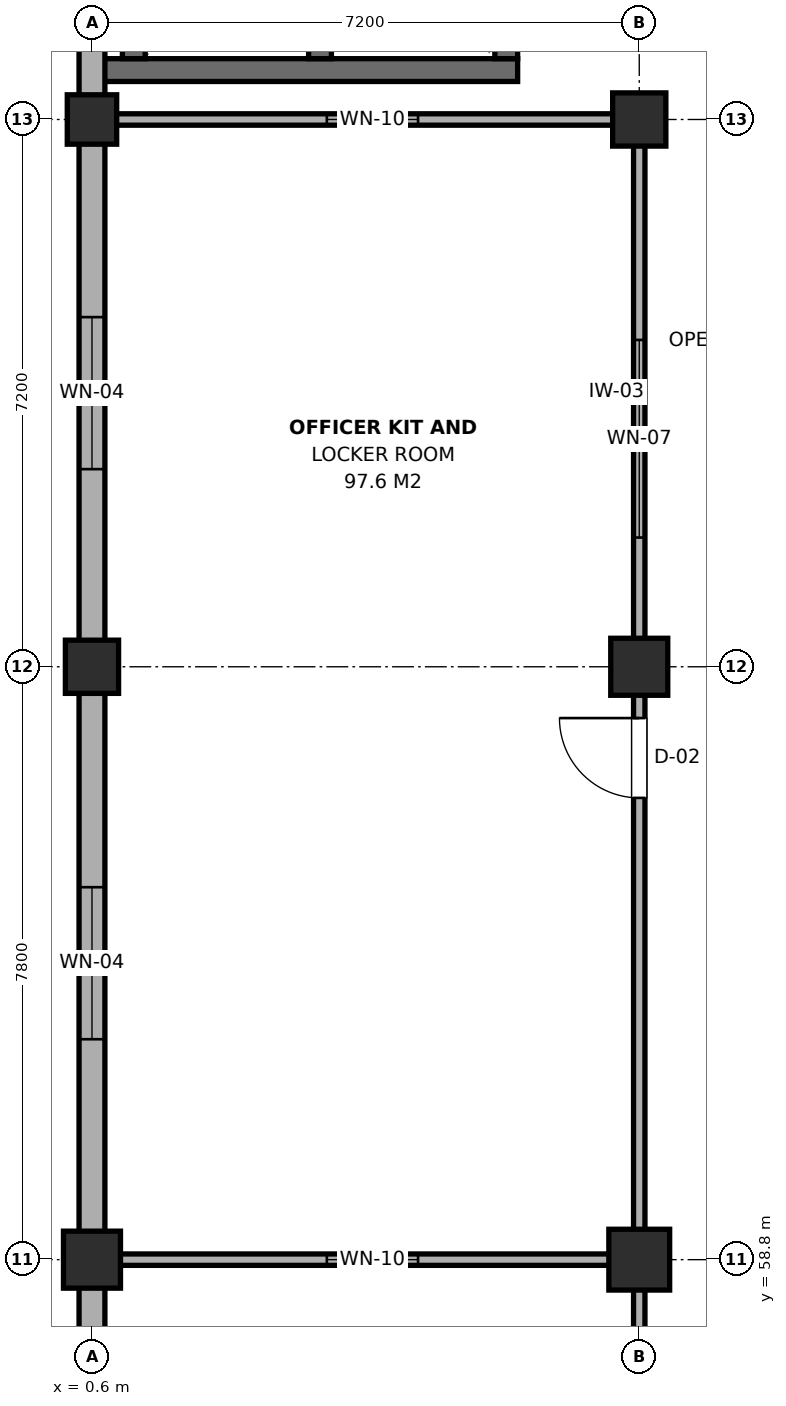
"""IFC4 building model, lengths in metres.
Left out: names, types, materials, properties, quantities, classifications, styles, units other than length and angle.
Written with IfcOpenShell. Run it as: python <this file> out.ifc"""

import sys

from ifc_helpers import new_model, si_unit, direction, frame, frame_2d, origin, origin_2d, place, context, subcontext, project, spatial, rectangle, extrude, element, fill, save


model = new_model("IFC4")
c1 = context("Model", 3, precision=1e-05, world=origin(), true_north=direction((0.0, 1.0)))
c2 = subcontext(c1, "Body", "Model", "MODEL_VIEW")
j1 = project(units=[si_unit("LENGTHUNIT", "METRE"), si_unit("PLANEANGLEUNIT", "RADIAN")], contexts=[c1])
p1 = place(None, origin())
s1 = spatial("IfcSite", under=j1, at=p1, CompositionType="ELEMENT")
p2 = place(p1, origin())
s2 = spatial("IfcBuilding", under=s1, at=p2, CompositionType="ELEMENT")
p3 = place(p2, origin())
s3 = spatial("IfcBuildingStorey", under=s2, at=p3, CompositionType="ELEMENT", Elevation=0.0)
p4 = place(p3, frame((0.6, 58.8, 0.0), z_axis=(0.0, 0.0, 1.0), x_axis=(1.0, 0.0, 0.0)))
e1 = element("IfcColumn", 1, at=p4, inside=s3, PredefinedType="COLUMN", context=c2, shape_type="SweptSolid", body=[
    extrude(rectangle(XDim=0.75, YDim=0.75, at=origin_2d()), origin(), (0.0, 0.0, 1.0), 4.8),
])
p5 = place(p3, frame((0.6, 66.6, 0.0), z_axis=(0.0, 0.0, 1.0), x_axis=(1.0, 0.0, 0.0)))
e2 = element("IfcColumn", 2, at=p5, inside=s3, PredefinedType="COLUMN", context=c2, shape_type="SweptSolid", body=[
    extrude(rectangle(XDim=0.7, YDim=0.7, at=origin_2d()), origin(), (0.0, 0.0, 1.0), 4.8),
])
p6 = place(p3, frame((0.6, 73.8, 0.0), z_axis=(0.0, 0.0, 1.0), x_axis=(1.0, 0.0, 0.0)))
e3 = element("IfcColumn", 3, at=p6, inside=s3, PredefinedType="COLUMN", context=c2, shape_type="SweptSolid", body=[
    extrude(rectangle(XDim=0.65, YDim=0.65, at=origin_2d()), origin(), (0.0, 0.0, 1.0), 4.8),
])
p7 = place(p3, frame((7.8, 58.8, 0.0), z_axis=(0.0, 0.0, 1.0), x_axis=(1.0, 0.0, 0.0)))
e4 = element("IfcColumn", 4, at=p7, inside=s3, PredefinedType="COLUMN", context=c2, shape_type="SweptSolid", body=[
    extrude(rectangle(XDim=0.8, YDim=0.8, at=origin_2d()), origin(), (0.0, 0.0, 1.0), 4.8),
])
p8 = place(p3, frame((7.8, 66.6, 0.0), z_axis=(0.0, 0.0, 1.0), x_axis=(1.0, 0.0, 0.0)))
e5 = element("IfcColumn", 5, at=p8, inside=s3, PredefinedType="COLUMN", context=c2, shape_type="SweptSolid", body=[
    extrude(rectangle(XDim=0.75, YDim=0.75, at=origin_2d()), origin(), (0.0, 0.0, 1.0), 4.8),
])
p9 = place(p3, frame((7.8, 73.8, 0.0), z_axis=(0.0, 0.0, 1.0), x_axis=(1.0, 0.0, 0.0)))
e6 = element("IfcColumn", 6, at=p9, inside=s3, PredefinedType="COLUMN", context=c2, shape_type="SweptSolid", body=[
    extrude(rectangle(XDim=0.7, YDim=0.7, at=origin_2d()), origin(), (0.0, 0.0, 1.0), 4.8),
])
p10 = place(p3, frame((0.75, 74.45, 0.0), z_axis=(0.0, 0.0, 1.0), x_axis=(1.0, 0.0, 0.0)))
e7 = element("IfcWall", 7, at=p10, inside=s3, PredefinedType="SHEAR", context=c2, shape_type="SweptSolid", body=[
    extrude(rectangle(XDim=5.45, YDim=0.3, at=frame_2d((2.725, 0.0))), origin(), (0.0, 0.0, 1.0), 4.56),
])
for number, where, z_axis, x_axis in (
    (8, (1.15, 74.6, 0.0), (0.0, 0.0, 1.0), (0.0, 1.0, 0.0)),
    (9, (3.6, 74.6, 0.0), (0.0, 0.0, 1.0), (0.0, 1.0, 0.0)),
):
    element("IfcWall", number, at=place(p3, frame(where, z_axis=z_axis, x_axis=x_axis)), inside=s3, PredefinedType="SHEAR", context=c2, shape_type="SweptSolid", body=[
        extrude(rectangle(XDim=3.0, YDim=0.3, at=frame_2d((1.5, 0.0))), origin(), (0.0, 0.0, 1.0), 4.56),
    ])
p11 = place(p3, frame((6.05, 74.6, 0.0), z_axis=(0.0, 0.0, 1.0), x_axis=(0.0, 1.0, 0.0)))
e10 = element("IfcWall", 10, at=p11, inside=s3, PredefinedType="SHEAR", context=c2, shape_type="SweptSolid", body=[
    extrude(rectangle(XDim=2.4, YDim=0.3, at=frame_2d((1.2, 0.0))), origin(), (0.0, 0.0, 1.0), 4.56),
])
p12 = place(p11, frame((0.7, 0.0, 0.0)))
e11 = element("IfcOpeningElement", 11, at=p12, cuts=e10, PredefinedType="OPENING", context=c2, shape_type="SweptSolid", body=[
    extrude(rectangle(XDim=1.0, YDim=2.15, at=frame_2d((0.5, 1.075))), frame((0.0, 0.165, 0.0), z_axis=(0.0, -1.0, 0.0), x_axis=(1.0, 0.0, 0.0)), (0.0, 0.0, 1.0), 0.33),
])
p13 = place(p3, frame((0.6, 53.2, 0.0), z_axis=(0.0, 0.0, 1.0), x_axis=(0.0, 1.0, 0.0)))
e12 = element("IfcWall", 12, at=p13, inside=s3, PredefinedType="SOLIDWALL", context=c2, shape_type="SweptSolid", body=[
    extrude(rectangle(XDim=5.6, YDim=0.34, at=frame_2d((2.8, 0.0))), origin(), (0.0, 0.0, 1.0), 3.955),
])
p14 = place(p13, frame((1.8, 0.0, 0.9)))
e13 = element("IfcOpeningElement", 13, at=p14, cuts=e12, PredefinedType="OPENING", context=c2, shape_type="SweptSolid", body=[
    extrude(rectangle(XDim=2.0, YDim=1.8, at=frame_2d((1.0, 0.9))), frame((0.0, 0.185, 0.0), z_axis=(0.0, -1.0, 0.0), x_axis=(1.0, 0.0, 0.0)), (0.0, 0.0, 1.0), 0.37),
])
p15 = place(p3, frame((0.6, 58.8, 0.0), z_axis=(0.0, 0.0, 1.0), x_axis=(0.0, 1.0, 0.0)))
e14 = element("IfcWall", 14, at=p15, inside=s3, PredefinedType="SOLIDWALL", context=c2, shape_type="SweptSolid", body=[
    extrude(rectangle(XDim=7.8, YDim=0.34, at=frame_2d((3.9, 0.0))), origin(), (0.0, 0.0, 1.0), 4.005),
])
p16 = place(p15, frame((2.9, 0.0, 0.9)))
e15 = element("IfcOpeningElement", 15, at=p16, cuts=e14, PredefinedType="OPENING", context=c2, shape_type="SweptSolid", body=[
    extrude(rectangle(XDim=2.0, YDim=1.8, at=frame_2d((1.0, 0.9))), frame((0.0, 0.185, 0.0), z_axis=(0.0, -1.0, 0.0), x_axis=(1.0, 0.0, 0.0)), (0.0, 0.0, 1.0), 0.37),
])
p17 = place(p3, frame((0.6, 66.6, 0.0), z_axis=(0.0, 0.0, 1.0), x_axis=(0.0, 1.0, 0.0)))
e16 = element("IfcWall", 16, at=p17, inside=s3, PredefinedType="SOLIDWALL", context=c2, shape_type="SweptSolid", body=[
    extrude(rectangle(XDim=7.2, YDim=0.34, at=frame_2d((3.6, 0.0))), origin(), (0.0, 0.0, 1.0), 4.055),
])
p18 = place(p17, frame((2.6, 0.0, 0.9)))
e17 = element("IfcOpeningElement", 17, at=p18, cuts=e16, PredefinedType="OPENING", context=c2, shape_type="SweptSolid", body=[
    extrude(rectangle(XDim=2.0, YDim=1.8, at=frame_2d((1.0, 0.9))), frame((0.0, 0.185, 0.0), z_axis=(0.0, -1.0, 0.0), x_axis=(1.0, 0.0, 0.0)), (0.0, 0.0, 1.0), 0.37),
])
p19 = place(p3, frame((0.6, 73.8, 0.0), z_axis=(0.0, 0.0, 1.0), x_axis=(0.0, 1.0, 0.0)))
e18 = element("IfcWall", 18, at=p19, inside=s3, PredefinedType="SOLIDWALL", context=c2, shape_type="SweptSolid", body=[
    extrude(rectangle(XDim=7.2, YDim=0.34, at=frame_2d((3.6, 0.0))), origin(), (0.0, 0.0, 1.0), 4.105),
])
p20 = place(p3, frame((7.8, 40.4, 0.0), z_axis=(0.0, 0.0, 1.0), x_axis=(0.0, 1.0, 0.0)))
e19 = element("IfcWall", 19, at=p20, inside=s3, PredefinedType="PARTITIONING", context=c2, shape_type="SweptSolid", body=[
    extrude(rectangle(XDim=18.4, YDim=0.15, at=frame_2d((9.2, 0.0))), origin(), (0.0, 0.0, 1.0), 3.955),
])
p21 = place(p20, frame((8.4, 0.0, 0.0)))
e20 = element("IfcOpeningElement", 20, at=p21, cuts=e19, PredefinedType="OPENING", context=c2, shape_type="SweptSolid", body=[
    extrude(rectangle(XDim=1.6, YDim=2.15, at=frame_2d((0.8, 1.075))), frame((0.0, 0.09, 0.0), z_axis=(0.0, -1.0, 0.0), x_axis=(1.0, 0.0, 0.0)), (0.0, 0.0, 1.0), 0.18),
])
p22 = place(p20, frame((3.3, 0.0, 0.95)))
e21 = element("IfcOpeningElement", 21, at=p22, cuts=e19, PredefinedType="OPENING", context=c2, shape_type="SweptSolid", body=[
    extrude(rectangle(XDim=2.6, YDim=1.5, at=frame_2d((1.3, 0.75))), frame((0.0, 0.09, 0.0), z_axis=(0.0, -1.0, 0.0), x_axis=(1.0, 0.0, 0.0)), (0.0, 0.0, 1.0), 0.18),
])
p23 = place(p3, frame((7.8, 58.8, 0.0), z_axis=(0.0, 0.0, 1.0), x_axis=(0.0, 1.0, 0.0)))
e22 = element("IfcWall", 22, at=p23, inside=s3, PredefinedType="PARTITIONING", context=c2, shape_type="SweptSolid", body=[
    extrude(rectangle(XDim=15.0, YDim=0.15, at=frame_2d((7.5, 0.0))), origin(), (0.0, 0.0, 1.0), 4.005),
])
p24 = place(p23, frame((6.075, 0.0, 0.0)))
e23 = element("IfcOpeningElement", 23, at=p24, cuts=e22, PredefinedType="OPENING", context=c2, shape_type="SweptSolid", body=[
    extrude(rectangle(XDim=1.05, YDim=2.15, at=frame_2d((0.525, 1.075))), frame((0.0, 0.09, 0.0), z_axis=(0.0, -1.0, 0.0), x_axis=(1.0, 0.0, 0.0)), (0.0, 0.0, 1.0), 0.18),
])
p25 = place(p23, frame((9.5, 0.0, 0.95)))
e24 = element("IfcOpeningElement", 24, at=p25, cuts=e22, PredefinedType="OPENING", context=c2, shape_type="SweptSolid", body=[
    extrude(rectangle(XDim=2.6, YDim=1.5, at=frame_2d((1.3, 0.75))), frame((0.0, 0.09, 0.0), z_axis=(0.0, -1.0, 0.0), x_axis=(1.0, 0.0, 0.0)), (0.0, 0.0, 1.0), 0.18),
])
p26 = place(p3, frame((0.78, 58.8, 0.0), z_axis=(0.0, 0.0, 1.0), x_axis=(1.0, 0.0, 0.0)))
e25 = element("IfcWall", 25, at=p26, inside=s3, PredefinedType="PARTITIONING", context=c2, shape_type="SweptSolid", body=[
    extrude(rectangle(XDim=7.02, YDim=0.15, at=frame_2d((3.51, 0.0))), origin(), (0.0, 0.0, 1.0), 4.205),
])
p27 = place(p26, frame((2.91, 0.0, 0.95)))
e26 = element("IfcOpeningElement", 26, at=p27, cuts=e25, PredefinedType="OPENING", context=c2, shape_type="SweptSolid", body=[
    extrude(rectangle(XDim=1.2, YDim=1.5, at=frame_2d((0.6, 0.75))), frame((0.0, 0.09, 0.0), z_axis=(0.0, -1.0, 0.0), x_axis=(1.0, 0.0, 0.0)), (0.0, 0.0, 1.0), 0.18),
])
p28 = place(p3, frame((0.78, 73.8, 0.0), z_axis=(0.0, 0.0, 1.0), x_axis=(1.0, 0.0, 0.0)))
e27 = element("IfcWall", 27, at=p28, inside=s3, PredefinedType="PARTITIONING", context=c2, shape_type="SweptSolid", body=[
    extrude(rectangle(XDim=7.02, YDim=0.15, at=frame_2d((3.51, 0.0))), origin(), (0.0, 0.0, 1.0), 4.105),
])
p29 = place(p28, frame((2.91, 0.0, 0.95)))
e28 = element("IfcOpeningElement", 28, at=p29, cuts=e27, PredefinedType="OPENING", context=c2, shape_type="SweptSolid", body=[
    extrude(rectangle(XDim=1.2, YDim=1.5, at=frame_2d((0.6, 0.75))), frame((0.0, 0.09, 0.0), z_axis=(0.0, -1.0, 0.0), x_axis=(1.0, 0.0, 0.0)), (0.0, 0.0, 1.0), 0.18),
])
p30 = place(p16, origin())
e29 = element("IfcWindow", 29, at=p30, inside=s3, PartitioningType="SINGLE_PANEL", PredefinedType="WINDOW", context=c2, shape_type="SweptSolid", body=[
    extrude(rectangle(XDim=2.0, YDim=1.8, at=frame_2d((1.0, 0.9))), frame((0.0, 0.03, 0.0), z_axis=(0.0, -1.0, 0.0), x_axis=(1.0, 0.0, 0.0)), (0.0, 0.0, 1.0), 0.06),
])
fill(e15, e29)
p31 = place(p18, origin())
e30 = element("IfcWindow", 30, at=p31, inside=s3, PartitioningType="SINGLE_PANEL", PredefinedType="WINDOW", context=c2, shape_type="SweptSolid", body=[
    extrude(rectangle(XDim=2.0, YDim=1.8, at=frame_2d((1.0, 0.9))), frame((0.0, 0.03, 0.0), z_axis=(0.0, -1.0, 0.0), x_axis=(1.0, 0.0, 0.0)), (0.0, 0.0, 1.0), 0.06),
])
fill(e17, e30)
p32 = place(p24, origin())
e31 = element("IfcDoor", 31, at=p32, inside=s3, OperationType="SINGLE_SWING_RIGHT", PredefinedType="DOOR", context=c2, shape_type="SweptSolid", body=[
    extrude(rectangle(XDim=1.05, YDim=2.15, at=frame_2d((0.525, 1.075))), frame((0.0, 0.025, 0.0), z_axis=(0.0, -1.0, 0.0), x_axis=(1.0, 0.0, 0.0)), (0.0, 0.0, 1.0), 0.05),
])
fill(e23, e31)
p33 = place(p25, origin())
e32 = element("IfcWindow", 32, at=p33, inside=s3, PartitioningType="SINGLE_PANEL", PredefinedType="WINDOW", context=c2, shape_type="SweptSolid", body=[
    extrude(rectangle(XDim=2.6, YDim=1.5, at=frame_2d((1.3, 0.75))), frame((0.0, 0.03, 0.0), z_axis=(0.0, -1.0, 0.0), x_axis=(1.0, 0.0, 0.0)), (0.0, 0.0, 1.0), 0.06),
])
fill(e24, e32)
p34 = place(p27, origin())
e33 = element("IfcWindow", 33, at=p34, inside=s3, PartitioningType="SINGLE_PANEL", PredefinedType="WINDOW", context=c2, shape_type="SweptSolid", body=[
    extrude(rectangle(XDim=1.2, YDim=1.5, at=frame_2d((0.6, 0.75))), frame((0.0, 0.03, 0.0), z_axis=(0.0, -1.0, 0.0), x_axis=(1.0, 0.0, 0.0)), (0.0, 0.0, 1.0), 0.06),
])
fill(e26, e33)
p35 = place(p29, origin())
e34 = element("IfcWindow", 34, at=p35, inside=s3, PartitioningType="SINGLE_PANEL", PredefinedType="WINDOW", context=c2, shape_type="SweptSolid", body=[
    extrude(rectangle(XDim=1.2, YDim=1.5, at=frame_2d((0.6, 0.75))), frame((0.0, 0.03, 0.0), z_axis=(0.0, -1.0, 0.0), x_axis=(1.0, 0.0, 0.0)), (0.0, 0.0, 1.0), 0.06),
])
fill(e28, e34)
save(model, sys.argv[1])
